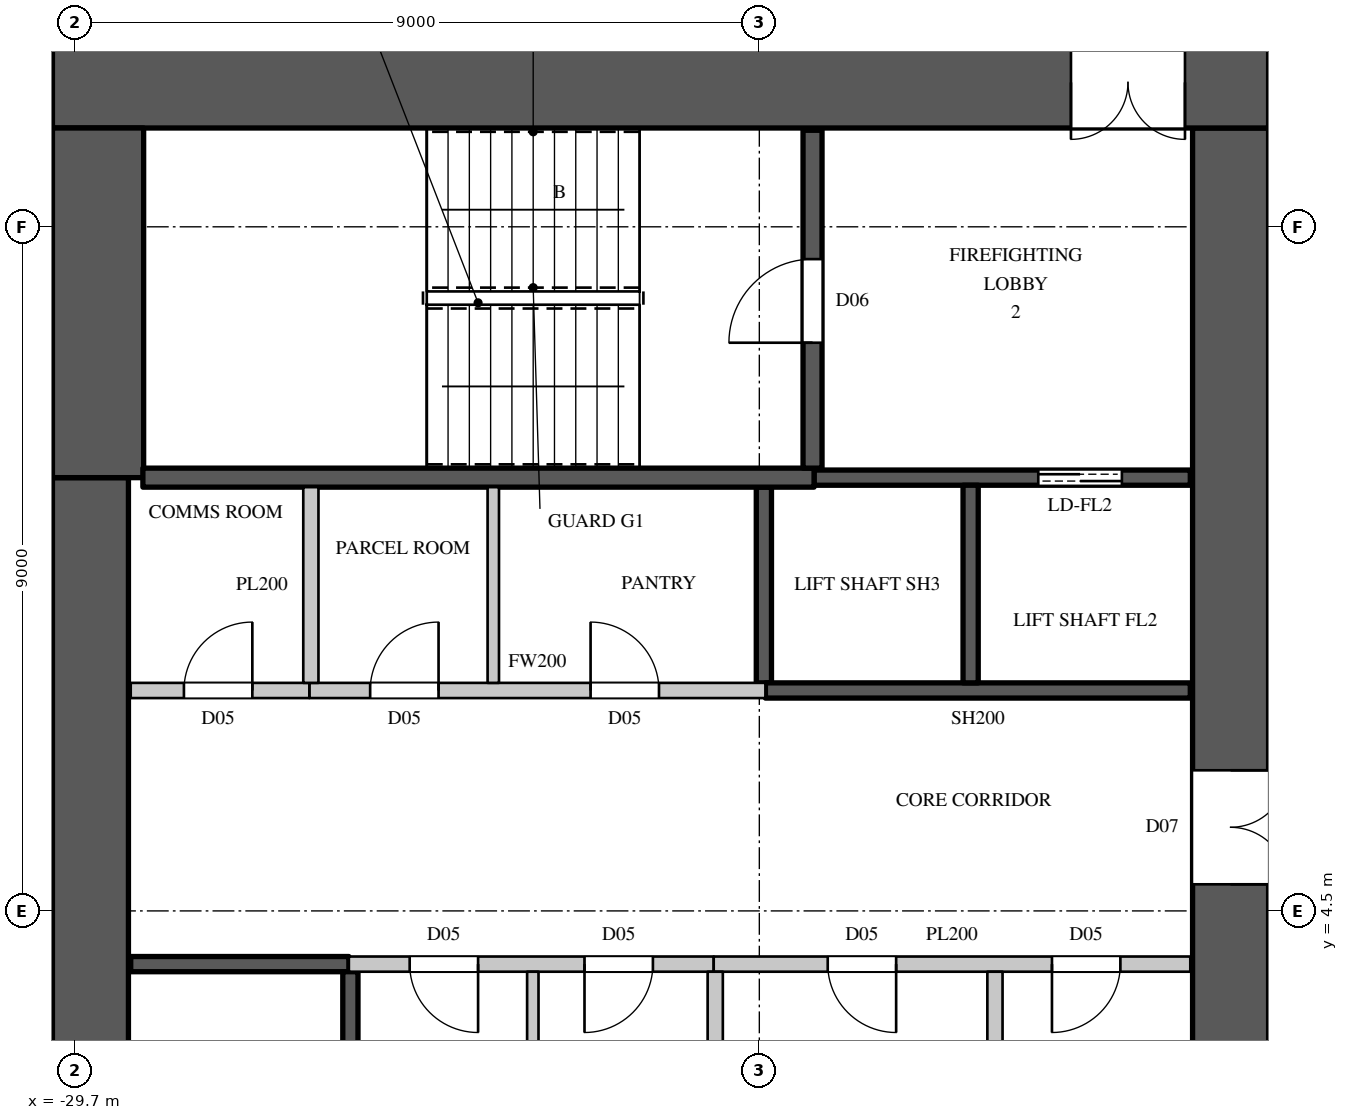
"""IFC4 building model, lengths in metres.
Left out: names, types, materials, properties, quantities, classifications, styles, units other than length and angle.
Written with IfcOpenShell. Run it as: python <this file> out.ifc"""

import sys

from ifc_helpers import new_model, si_unit, direction, frame, frame_2d, origin, place, context, subcontext, project, spatial, rectangle, extrude, element, fill, save


model = new_model("IFC4")
c1 = context("Model", 3, precision=1e-05, world=origin(), true_north=direction((0.0, 1.0)))
c2 = subcontext(c1, "Body", "Model", "MODEL_VIEW")
j1 = project(units=[si_unit("LENGTHUNIT", "METRE"), si_unit("PLANEANGLEUNIT", "RADIAN")], contexts=[c1])
p1 = place(None, origin())
s1 = spatial("IfcSite", under=j1, at=p1, CompositionType="ELEMENT")
p2 = place(p1, origin())
s2 = spatial("IfcBuilding", under=s1, at=p2, CompositionType="ELEMENT")
p3 = place(p2, frame((0.0, 0.0, 127.5)))
s3 = spatial("IfcBuildingStorey", under=s2, at=p3, CompositionType="ELEMENT", Elevation=127.5)
p4 = place(p3, frame((-30.0, 15.4, 0.0), z_axis=(0.0, 0.0, 1.0), x_axis=(1.0, 0.0, 0.0)))
e1 = element("IfcWall", 1, at=p4, inside=s3, PredefinedType="SHEAR", context=c2, shape_type="SweptSolid", body=[
    extrude(rectangle(XDim=16.0, YDim=1.2, at=frame_2d((8.0, 0.0))), origin(), (0.0, 0.0, 1.0), 3.6),
])
p5 = place(p4, frame((13.4, 0.0, 0.0)))
e2 = element("IfcOpeningElement", 2, at=p5, cuts=e1, PredefinedType="OPENING", context=c2, shape_type="SweptSolid", body=[
    extrude(rectangle(XDim=1.5, YDim=2.4, at=frame_2d((0.75, 1.2))), frame((0.0, 0.61, 0.0), z_axis=(0.0, -1.0, 0.0), x_axis=(1.0, 0.0, 0.0)), (0.0, 0.0, 1.0), 1.22),
])
p6 = place(p3, frame((-14.5, -14.8, 0.0), z_axis=(0.0, 0.0, 1.0), x_axis=(0.0, 1.0, 0.0)))
e3 = element("IfcWall", 3, at=p6, inside=s3, PredefinedType="SHEAR", context=c2, shape_type="SweptSolid", body=[
    extrude(rectangle(XDim=29.6, YDim=1.0, at=frame_2d((14.8, 0.0))), origin(), (0.0, 0.0, 1.0), 3.6),
])
p7 = place(p6, frame((8.45, 0.0, 0.0)))
e4 = element("IfcOpeningElement", 4, at=p7, cuts=e3, PredefinedType="OPENING", context=c2, shape_type="SweptSolid", body=[
    extrude(rectangle(XDim=1.5, YDim=2.4, at=frame_2d((0.75, 1.2))), frame((0.0, 0.51, 0.0), z_axis=(0.0, -1.0, 0.0), x_axis=(1.0, 0.0, 0.0)), (0.0, 0.0, 1.0), 1.02),
])
p8 = place(p6, frame((19.65, 0.0, 0.0)))
e5 = element("IfcOpeningElement", 5, at=p8, cuts=e3, PredefinedType="OPENING", context=c2, shape_type="SweptSolid", body=[
    extrude(rectangle(XDim=1.5, YDim=2.4, at=frame_2d((0.75, 1.2))), frame((0.0, 0.51, 0.0), z_axis=(0.0, -1.0, 0.0), x_axis=(1.0, 0.0, 0.0)), (0.0, 0.0, 1.0), 1.02),
])
p9 = place(p6, frame((14.5, 0.0, 0.0)))
e6 = element("IfcOpeningElement", 6, at=p9, cuts=e3, PredefinedType="OPENING", context=c2, shape_type="SweptSolid", body=[
    extrude(rectangle(XDim=0.6, YDim=2.0, at=frame_2d((0.3, 1.0))), frame((0.0, 0.51, 0.0), z_axis=(0.0, -1.0, 0.0), x_axis=(1.0, 0.0, 0.0)), (0.0, 0.0, 1.0), 1.02),
])
p10 = place(p3, frame((-29.5, -10.2, 0.0), z_axis=(0.0, 0.0, 1.0), x_axis=(0.0, 1.0, 0.0)))
e7 = element("IfcWall", 7, at=p10, inside=s3, PredefinedType="SHEAR", context=c2, shape_type="SweptSolid", body=[
    extrude(rectangle(XDim=20.4, YDim=1.0, at=frame_2d((10.2, 0.0))), origin(), (0.0, 0.0, 1.0), 3.6),
])
p11 = place(p3, frame((-29.4, 10.2, 0.0), z_axis=(0.0, 0.0, 1.0), x_axis=(0.0, 1.0, 0.0)))
e8 = element("IfcWall", 8, at=p11, inside=s3, PredefinedType="SHEAR", context=c2, shape_type="SweptSolid", body=[
    extrude(rectangle(XDim=4.6, YDim=1.2, at=frame_2d((2.3, 0.0))), origin(), (0.0, 0.0, 1.0), 3.6),
])
p12 = place(p3, frame((-26.62, 7.4, 0.0), z_axis=(0.0, 0.0, 1.0), x_axis=(1.0, 0.0, 0.0)))
e9 = element("IfcWall", 9, at=p12, inside=s3, PredefinedType="PARTITIONING", context=c2, shape_type="SweptSolid", body=[
    extrude(rectangle(XDim=6.0, YDim=0.2, at=frame_2d((3.0, 0.0))), origin(), (0.0, 0.0, 1.0), 3.3),
])
p13 = place(p12, frame((0.8, 0.0, 0.0)))
e10 = element("IfcOpeningElement", 10, at=p13, cuts=e9, PredefinedType="OPENING", context=c2, shape_type="SweptSolid", body=[
    extrude(rectangle(XDim=0.9, YDim=2.2, at=frame_2d((0.45, 1.1))), frame((0.0, 0.11, 0.0), z_axis=(0.0, -1.0, 0.0), x_axis=(1.0, 0.0, 0.0)), (0.0, 0.0, 1.0), 0.22),
])
p14 = place(p12, frame((3.7, 0.0, 0.0)))
e11 = element("IfcOpeningElement", 11, at=p14, cuts=e9, PredefinedType="OPENING", context=c2, shape_type="SweptSolid", body=[
    extrude(rectangle(XDim=0.9, YDim=2.2, at=frame_2d((0.45, 1.1))), frame((0.0, 0.11, 0.0), z_axis=(0.0, -1.0, 0.0), x_axis=(1.0, 0.0, 0.0)), (0.0, 0.0, 1.0), 0.22),
])
p15 = place(p3, frame((-26.1, 3.8, 0.0), z_axis=(0.0, 0.0, 1.0), x_axis=(1.0, 0.0, 0.0)))
e12 = element("IfcWall", 12, at=p15, inside=s3, PredefinedType="PARTITIONING", context=c2, shape_type="SweptSolid", body=[
    extrude(rectangle(XDim=4.8, YDim=0.2, at=frame_2d((2.4, 0.0))), origin(), (0.0, 0.0, 1.0), 3.3),
])
p16 = place(p15, frame((0.8, 0.0, 0.0)))
e13 = element("IfcOpeningElement", 13, at=p16, cuts=e12, PredefinedType="OPENING", context=c2, shape_type="SweptSolid", body=[
    extrude(rectangle(XDim=0.9, YDim=2.2, at=frame_2d((0.45, 1.1))), frame((0.0, 0.11, 0.0), z_axis=(0.0, -1.0, 0.0), x_axis=(1.0, 0.0, 0.0)), (0.0, 0.0, 1.0), 0.22),
])
p17 = place(p15, frame((3.1, 0.0, 0.0)))
e14 = element("IfcOpeningElement", 14, at=p17, cuts=e12, PredefinedType="OPENING", context=c2, shape_type="SweptSolid", body=[
    extrude(rectangle(XDim=0.9, YDim=2.2, at=frame_2d((0.45, 1.1))), frame((0.0, 0.11, 0.0), z_axis=(0.0, -1.0, 0.0), x_axis=(1.0, 0.0, 0.0)), (0.0, 0.0, 1.0), 0.22),
])
p18 = place(p3, frame((-24.2, 7.5, 0.0), z_axis=(0.0, 0.0, 1.0), x_axis=(0.0, 1.0, 0.0)))
e15 = element("IfcWall", 15, at=p18, inside=s3, PredefinedType="PARTITIONING", context=c2, shape_type="SweptSolid", body=[
    extrude(rectangle(XDim=2.575, YDim=0.15, at=frame_2d((1.288, 0.0))), origin(), (0.0, 0.0, 1.0), 3.3),
])
p19 = place(p3, frame((-23.68, 1.1, 0.0), z_axis=(0.0, 0.0, 1.0), x_axis=(0.0, 1.0, 0.0)))
e16 = element("IfcWall", 16, at=p19, inside=s3, PredefinedType="PARTITIONING", context=c2, shape_type="SweptSolid", body=[
    extrude(rectangle(XDim=2.6, YDim=0.15, at=frame_2d((1.3, 0.0))), origin(), (0.0, 0.0, 1.0), 3.3),
])
p20 = place(p3, frame((-28.97, 7.4, 0.0), z_axis=(0.0, 0.0, 1.0), x_axis=(1.0, 0.0, 0.0)))
e17 = element("IfcWall", 17, at=p20, inside=s3, PredefinedType="PARTITIONING", context=c2, shape_type="SweptSolid", body=[
    extrude(rectangle(XDim=2.35, YDim=0.2, at=frame_2d((1.175, 0.0))), origin(), (0.0, 0.0, 1.0), 3.3),
])
p21 = place(p20, frame((0.7, 0.0, 0.0)))
e18 = element("IfcOpeningElement", 18, at=p21, cuts=e17, PredefinedType="OPENING", context=c2, shape_type="SweptSolid", body=[
    extrude(rectangle(XDim=0.9, YDim=2.2, at=frame_2d((0.45, 1.1))), frame((0.0, 0.11, 0.0), z_axis=(0.0, -1.0, 0.0), x_axis=(1.0, 0.0, 0.0)), (0.0, 0.0, 1.0), 0.22),
])
p22 = place(p3, frame((-26.6, 7.5, 0.0), z_axis=(0.0, 0.0, 1.0), x_axis=(0.0, 1.0, 0.0)))
e19 = element("IfcWall", 19, at=p22, inside=s3, PredefinedType="PARTITIONING", context=c2, shape_type="SweptSolid", body=[
    extrude(rectangle(XDim=2.575, YDim=0.2, at=frame_2d((1.288, 0.0))), origin(), (0.0, 0.0, 1.0), 3.3),
])
p23 = place(p3, frame((-21.3, 3.8, 0.0), z_axis=(0.0, 0.0, 1.0), x_axis=(1.0, 0.0, 0.0)))
e20 = element("IfcWall", 20, at=p23, inside=s3, PredefinedType="PARTITIONING", context=c2, shape_type="SweptSolid", body=[
    extrude(rectangle(XDim=6.27, YDim=0.2, at=frame_2d((3.135, 0.0))), origin(), (0.0, 0.0, 1.0), 3.3),
])
p24 = place(p23, frame((1.5, 0.0, 0.0)))
e21 = element("IfcOpeningElement", 21, at=p24, cuts=e20, PredefinedType="OPENING", context=c2, shape_type="SweptSolid", body=[
    extrude(rectangle(XDim=0.9, YDim=2.2, at=frame_2d((0.45, 1.1))), frame((0.0, 0.11, 0.0), z_axis=(0.0, -1.0, 0.0), x_axis=(1.0, 0.0, 0.0)), (0.0, 0.0, 1.0), 0.22),
])
p25 = place(p23, frame((4.45, 0.0, 0.0)))
e22 = element("IfcOpeningElement", 22, at=p25, cuts=e20, PredefinedType="OPENING", context=c2, shape_type="SweptSolid", body=[
    extrude(rectangle(XDim=0.9, YDim=2.2, at=frame_2d((0.45, 1.1))), frame((0.0, 0.11, 0.0), z_axis=(0.0, -1.0, 0.0), x_axis=(1.0, 0.0, 0.0)), (0.0, 0.0, 1.0), 0.22),
])
for number, where, z_axis, x_axis in (
    (23, (-21.28, 1.1, 0.0), (0.0, 0.0, 1.0), (0.0, 1.0, 0.0)),
    (24, (-17.6, 1.1, 0.0), (0.0, 0.0, 1.0), (0.0, 1.0, 0.0)),
):
    element("IfcWall", number, at=place(p3, frame(where, z_axis=z_axis, x_axis=x_axis)), inside=s3, PredefinedType="PARTITIONING", context=c2, shape_type="SweptSolid", body=[
        extrude(rectangle(XDim=2.6, YDim=0.2, at=frame_2d((1.3, 0.0))), origin(), (0.0, 0.0, 1.0), 3.3),
    ])
p26 = place(p3, frame((-28.97, 3.8, 0.0), z_axis=(0.0, 0.0, 1.0), x_axis=(1.0, 0.0, 0.0)))
e25 = element("IfcWall", 25, at=p26, inside=s3, PredefinedType="SHEAR", context=c2, shape_type="SweptSolid", body=[
    extrude(rectangle(XDim=2.87, YDim=0.2, at=frame_2d((1.435, 0.0))), origin(), (0.0, 0.0, 1.0), 3.3),
])
p27 = place(p3, frame((-26.08, 1.1, 0.0), z_axis=(0.0, 0.0, 1.0), x_axis=(0.0, 1.0, 0.0)))
e26 = element("IfcWall", 26, at=p27, inside=s3, PredefinedType="SHEAR", context=c2, shape_type="SweptSolid", body=[
    extrude(rectangle(XDim=2.6, YDim=0.2, at=frame_2d((1.3, 0.0))), origin(), (0.0, 0.0, 1.0), 3.3),
])
p28 = place(p3, frame((-20.64, 7.5, 0.0), z_axis=(0.0, 0.0, 1.0), x_axis=(0.0, 1.0, 0.0)))
e27 = element("IfcWall", 27, at=p28, inside=s3, PredefinedType="SHEAR", context=c2, shape_type="SweptSolid", body=[
    extrude(rectangle(XDim=2.575, YDim=0.2, at=frame_2d((1.288, 0.0))), origin(), (0.0, 0.0, 1.0), 3.3),
])
p29 = place(p3, frame((-20.62, 7.4, 0.0), z_axis=(0.0, 0.0, 1.0), x_axis=(1.0, 0.0, 0.0)))
e28 = element("IfcWall", 28, at=p29, inside=s3, PredefinedType="SHEAR", context=c2, shape_type="SweptSolid", body=[
    extrude(rectangle(XDim=5.59, YDim=0.2, at=frame_2d((2.795, 0.0))), origin(), (0.0, 0.0, 1.0), 3.3),
])
p30 = place(p3, frame((-19.98, 10.2, 0.0), z_axis=(0.0, 0.0, 1.0), x_axis=(1.0, 0.0, 0.0)))
e29 = element("IfcWall", 29, at=p30, inside=s3, PredefinedType="SHEAR", context=c2, shape_type="SweptSolid", body=[
    extrude(rectangle(XDim=4.95, YDim=0.2, at=frame_2d((2.475, 0.0))), origin(), (0.0, 0.0, 1.0), 3.3),
])
p31 = place(p30, frame((2.95, 0.0, 0.0)))
e30 = element("IfcOpeningElement", 30, at=p31, cuts=e29, PredefinedType="OPENING", context=c2, shape_type="SweptSolid", body=[
    extrude(rectangle(XDim=1.1, YDim=2.2, at=frame_2d((0.55, 1.1))), frame((0.0, 0.11, 0.0), z_axis=(0.0, -1.0, 0.0), x_axis=(1.0, 0.0, 0.0)), (0.0, 0.0, 1.0), 0.22),
])
p32 = place(p3, frame((-17.92, 7.5, 0.0), z_axis=(0.0, 0.0, 1.0), x_axis=(0.0, 1.0, 0.0)))
e31 = element("IfcWall", 31, at=p32, inside=s3, PredefinedType="SHEAR", context=c2, shape_type="SweptSolid", body=[
    extrude(rectangle(XDim=2.6, YDim=0.2, at=frame_2d((1.3, 0.0))), origin(), (0.0, 0.0, 1.0), 3.6),
])
p33 = place(p3, frame((-28.81, 10.2, 0.0), z_axis=(0.0, 0.0, 1.0), x_axis=(1.0, 0.0, 0.0)))
e32 = element("IfcWall", 32, at=p33, inside=s3, PredefinedType="SHEAR", context=c2, shape_type="SweptSolid", body=[
    extrude(rectangle(XDim=8.83, YDim=0.25, at=frame_2d((4.415, 0.0))), origin(), (0.0, 0.0, 1.0), 3.3),
])
p34 = place(p3, frame((-20.0, 10.325, 0.0), z_axis=(0.0, 0.0, 1.0), x_axis=(0.0, 1.0, 0.0)))
e33 = element("IfcWall", 33, at=p34, inside=s3, PredefinedType="SHEAR", context=c2, shape_type="SweptSolid", body=[
    extrude(rectangle(XDim=4.445, YDim=0.25, at=frame_2d((2.223, 0.0))), origin(), (0.0, 0.0, 1.0), 3.3),
])
p35 = place(p34, frame((1.65, 0.0, 0.0)))
e34 = element("IfcOpeningElement", 34, at=p35, cuts=e33, PredefinedType="OPENING", context=c2, shape_type="SweptSolid", body=[
    extrude(rectangle(XDim=1.1, YDim=2.2, at=frame_2d((0.55, 1.1))), frame((0.0, 0.135, 0.0), z_axis=(0.0, -1.0, 0.0), x_axis=(1.0, 0.0, 0.0)), (0.0, 0.0, 1.0), 0.27),
])
p36 = place(p35, origin())
e35 = element("IfcDoor", 35, at=p36, inside=s3, OperationType="SINGLE_SWING_LEFT", PredefinedType="DOOR", context=c2, shape_type="SweptSolid", body=[
    extrude(rectangle(XDim=1.1, YDim=2.2, at=frame_2d((0.55, 1.1))), frame((0.0, 0.025, 0.0), z_axis=(0.0, -1.0, 0.0), x_axis=(1.0, 0.0, 0.0)), (0.0, 0.0, 1.0), 0.05),
])
fill(e34, e35)
p37 = place(p16, origin())
e36 = element("IfcDoor", 36, at=p37, inside=s3, OperationType="SINGLE_SWING_LEFT", PredefinedType="DOOR", context=c2, shape_type="SweptSolid", body=[
    extrude(rectangle(XDim=0.9, YDim=2.2, at=frame_2d((0.45, 1.1))), frame((0.0, 0.025, 0.0), z_axis=(0.0, -1.0, 0.0), x_axis=(1.0, 0.0, 0.0)), (0.0, 0.0, 1.0), 0.05),
])
fill(e13, e36)
p38 = place(p17, origin())
e37 = element("IfcDoor", 37, at=p38, inside=s3, OperationType="SINGLE_SWING_RIGHT", PredefinedType="DOOR", context=c2, shape_type="SweptSolid", body=[
    extrude(rectangle(XDim=0.9, YDim=2.2, at=frame_2d((0.45, 1.1))), frame((0.0, 0.025, 0.0), z_axis=(0.0, -1.0, 0.0), x_axis=(1.0, 0.0, 0.0)), (0.0, 0.0, 1.0), 0.05),
])
fill(e14, e37)
p39 = place(p24, origin())
e38 = element("IfcDoor", 38, at=p39, inside=s3, OperationType="SINGLE_SWING_LEFT", PredefinedType="DOOR", context=c2, shape_type="SweptSolid", body=[
    extrude(rectangle(XDim=0.9, YDim=2.2, at=frame_2d((0.45, 1.1))), frame((0.0, 0.025, 0.0), z_axis=(0.0, -1.0, 0.0), x_axis=(1.0, 0.0, 0.0)), (0.0, 0.0, 1.0), 0.05),
])
fill(e21, e38)
p40 = place(p25, origin())
e39 = element("IfcDoor", 39, at=p40, inside=s3, OperationType="SINGLE_SWING_RIGHT", PredefinedType="DOOR", context=c2, shape_type="SweptSolid", body=[
    extrude(rectangle(XDim=0.9, YDim=2.2, at=frame_2d((0.45, 1.1))), frame((0.0, 0.025, 0.0), z_axis=(0.0, -1.0, 0.0), x_axis=(1.0, 0.0, 0.0)), (0.0, 0.0, 1.0), 0.05),
])
fill(e22, e39)
p41 = place(p21, origin())
e40 = element("IfcDoor", 40, at=p41, inside=s3, OperationType="SINGLE_SWING_RIGHT", PredefinedType="DOOR", context=c2, shape_type="SweptSolid", body=[
    extrude(rectangle(XDim=0.9, YDim=2.2, at=frame_2d((0.45, 1.1))), frame((0.0, 0.025, 0.0), z_axis=(0.0, -1.0, 0.0), x_axis=(1.0, 0.0, 0.0)), (0.0, 0.0, 1.0), 0.05),
])
fill(e18, e40)
p42 = place(p13, origin())
e41 = element("IfcDoor", 41, at=p42, inside=s3, OperationType="SINGLE_SWING_RIGHT", PredefinedType="DOOR", context=c2, shape_type="SweptSolid", body=[
    extrude(rectangle(XDim=0.9, YDim=2.2, at=frame_2d((0.45, 1.1))), frame((0.0, 0.025, 0.0), z_axis=(0.0, -1.0, 0.0), x_axis=(1.0, 0.0, 0.0)), (0.0, 0.0, 1.0), 0.05),
])
fill(e10, e41)
p43 = place(p14, origin())
e42 = element("IfcDoor", 42, at=p43, inside=s3, OperationType="SINGLE_SWING_LEFT", PredefinedType="DOOR", context=c2, shape_type="SweptSolid", body=[
    extrude(rectangle(XDim=0.9, YDim=2.2, at=frame_2d((0.45, 1.1))), frame((0.0, 0.025, 0.0), z_axis=(0.0, -1.0, 0.0), x_axis=(1.0, 0.0, 0.0)), (0.0, 0.0, 1.0), 0.05),
])
fill(e11, e42)
p44 = place(p31, origin())
e43 = element("IfcDoor", 43, at=p44, inside=s3, OperationType="DOUBLE_DOOR_SLIDING", PredefinedType="DOOR", context=c2, shape_type="SweptSolid", body=[
    extrude(rectangle(XDim=1.1, YDim=2.2, at=frame_2d((0.55, 1.1))), frame((0.0, 0.025, 0.0), z_axis=(0.0, -1.0, 0.0), x_axis=(1.0, 0.0, 0.0)), (0.0, 0.0, 1.0), 0.05),
])
fill(e30, e43)
p45 = place(p5, origin())
e44 = element("IfcDoor", 44, at=p45, inside=s3, OperationType="DOUBLE_DOOR_SINGLE_SWING", PredefinedType="DOOR", context=c2, shape_type="SweptSolid", body=[
    extrude(rectangle(XDim=1.5, YDim=2.4, at=frame_2d((0.75, 1.2))), frame((0.0, 0.025, 0.0), z_axis=(0.0, -1.0, 0.0), x_axis=(1.0, 0.0, 0.0)), (0.0, 0.0, 1.0), 0.05),
])
fill(e2, e44)
p46 = place(p8, origin())
e45 = element("IfcDoor", 45, at=p46, inside=s3, OperationType="DOUBLE_DOOR_SINGLE_SWING", PredefinedType="DOOR", context=c2, shape_type="SweptSolid", body=[
    extrude(rectangle(XDim=1.5, YDim=2.4, at=frame_2d((0.75, 1.2))), frame((0.0, -0.445, 0.0), z_axis=(0.0, -1.0, 0.0), x_axis=(1.0, 0.0, 0.0)), (0.0, 0.0, 1.0), 0.05),
])
fill(e5, e45)
save(model, sys.argv[1])
